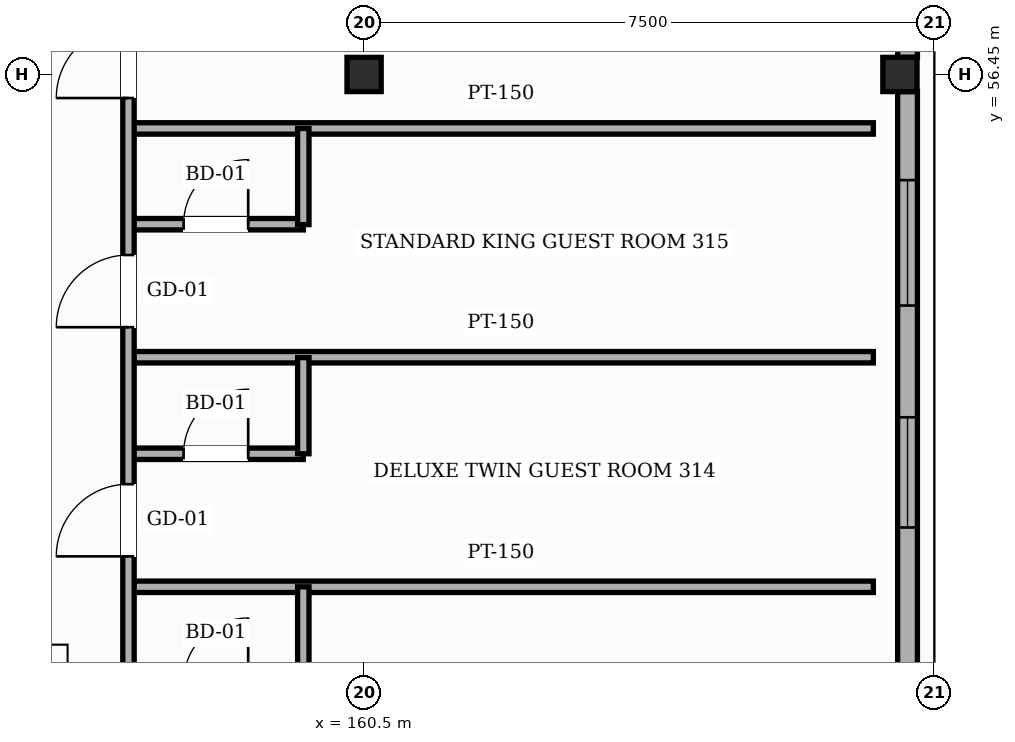
"""IFC4 building model, lengths in metres.
Left out: names, types, materials, properties, quantities, classifications, styles, units other than length and angle.
Written with IfcOpenShell. Run it as: python <this file> out.ifc"""

import sys

from ifc_helpers import new_model, si_unit, direction, frame, frame_2d, origin, origin_2d, place, context, subcontext, project, spatial, rectangle, hollow_rectangle, extrude, element, fill, save


model = new_model("IFC4")
c1 = context("Model", 3, precision=1e-05, world=origin(), true_north=direction((0.0, 1.0)))
c2 = subcontext(c1, "Body", "Model", "MODEL_VIEW")
j1 = project(units=[si_unit("LENGTHUNIT", "METRE"), si_unit("PLANEANGLEUNIT", "RADIAN")], contexts=[c1])
p1 = place(None, origin())
s1 = spatial("IfcSite", under=j1, at=p1, CompositionType="ELEMENT")
p2 = place(p1, origin())
s2 = spatial("IfcBuilding", under=s1, at=p2, CompositionType="ELEMENT")
p3 = place(p2, frame((0.0, 0.0, 42.6)))
s3 = spatial("IfcBuildingStorey", under=s2, at=p3, CompositionType="ELEMENT", Elevation=42.6)
for number, where, z_axis, x_axis in (
    (1, (160.5, 56.45, 0.0), (0.0, 0.0, 1.0), (1.0, 0.0, 0.0)),
    (2, (167.55, 56.45, 0.0), (0.0, 0.0, 1.0), (1.0, 0.0, 0.0)),
):
    element("IfcColumn", number, at=place(p3, frame(where, z_axis=z_axis, x_axis=x_axis)), inside=s3, PredefinedType="COLUMN", context=c2, shape_type="SweptSolid", body=[
        extrude(hollow_rectangle(XDim=0.45, YDim=0.45, WallThickness=0.019, InnerFilletRadius=0.019, OuterFilletRadius=0.038, at=origin_2d()), origin(), (0.0, 0.0, 1.0), 3.6),
    ])
p4 = place(p3, frame((167.65, 56.225, 0.0), z_axis=(0.0, 0.0, 1.0), x_axis=(0.0, -1.0, 0.0)))
e3 = element("IfcWall", 3, at=p4, inside=s3, PredefinedType="SOLIDWALL", context=c2, shape_type="SweptSolid", body=[
    extrude(rectangle(XDim=7.55, YDim=0.26, at=frame_2d((3.775, 0.0))), origin(), (0.0, 0.0, 1.0), 2.755),
])
p5 = place(p4, frame((4.285, 0.0, 0.85)))
e4 = element("IfcOpeningElement", 4, at=p5, cuts=e3, PredefinedType="OPENING", context=c2, shape_type="SweptSolid", body=[
    extrude(rectangle(XDim=1.45, YDim=1.35, at=frame_2d((0.725, 0.675))), frame((0.0, 0.14, 0.0), z_axis=(0.0, -1.0, 0.0), x_axis=(1.0, 0.0, 0.0)), (0.0, 0.0, 1.0), 0.28),
])
p6 = place(p4, frame((1.165, 0.0, 0.85)))
e5 = element("IfcOpeningElement", 5, at=p6, cuts=e3, PredefinedType="OPENING", context=c2, shape_type="SweptSolid", body=[
    extrude(rectangle(XDim=1.65, YDim=1.35, at=frame_2d((0.825, 0.675))), frame((0.0, 0.14, 0.0), z_axis=(0.0, -1.0, 0.0), x_axis=(1.0, 0.0, 0.0)), (0.0, 0.0, 1.0), 0.28),
])
p7 = place(p3, frame((167.65, 64.225, 0.0), z_axis=(0.0, 0.0, 1.0), x_axis=(0.0, -1.0, 0.0)))
e6 = element("IfcWall", 6, at=p7, inside=s3, PredefinedType="SOLIDWALL", context=c2, shape_type="SweptSolid", body=[
    extrude(rectangle(XDim=7.55, YDim=0.26, at=frame_2d((3.775, 0.0))), origin(), (0.0, 0.0, 1.0), 2.755),
])
p8 = place(p7, frame((6.085, 0.0, 0.85)))
e7 = element("IfcOpeningElement", 7, at=p8, cuts=e6, PredefinedType="OPENING", context=c2, shape_type="SweptSolid", body=[
    extrude(rectangle(XDim=0.85, YDim=1.35, at=frame_2d((0.425, 0.675))), frame((0.0, 0.14, 0.0), z_axis=(0.0, -1.0, 0.0), x_axis=(1.0, 0.0, 0.0)), (0.0, 0.0, 1.0), 0.28),
])
p9 = place(p7, frame((2.92, 0.0, 0.85)))
e8 = element("IfcOpeningElement", 8, at=p9, cuts=e6, PredefinedType="OPENING", context=c2, shape_type="SweptSolid", body=[
    extrude(rectangle(XDim=2.1, YDim=1.35, at=frame_2d((1.05, 0.675))), frame((0.0, 0.14, 0.0), z_axis=(0.0, -1.0, 0.0), x_axis=(1.0, 0.0, 0.0)), (0.0, 0.0, 1.0), 0.28),
])
p10 = place(p7, frame((0.81, 0.0, 0.85)))
e9 = element("IfcOpeningElement", 9, at=p10, cuts=e6, PredefinedType="OPENING", context=c2, shape_type="SweptSolid", body=[
    extrude(rectangle(XDim=0.85, YDim=1.35, at=frame_2d((0.425, 0.675))), frame((0.0, 0.14, 0.0), z_axis=(0.0, -1.0, 0.0), x_axis=(1.0, 0.0, 0.0)), (0.0, 0.0, 1.0), 0.28),
])
p11 = place(p3, frame((157.4, 49.71, 0.0), z_axis=(0.0, 0.0, 1.0), x_axis=(1.0, 0.0, 0.0)))
e10 = element("IfcWall", 10, at=p11, inside=s3, PredefinedType="PARTITIONING", context=c2, shape_type="SweptSolid", body=[
    extrude(rectangle(XDim=9.8, YDim=0.15, at=frame_2d((4.9, 0.0))), origin(), (0.0, 0.0, 1.0), 3.365),
])
p12 = place(p3, frame((157.4, 51.46, 0.0), z_axis=(0.0, 0.0, 1.0), x_axis=(1.0, 0.0, 0.0)))
e11 = element("IfcWall", 11, at=p12, inside=s3, PredefinedType="PARTITIONING", context=c2, shape_type="SweptSolid", body=[
    extrude(rectangle(XDim=2.3, YDim=0.15, at=frame_2d((1.15, 0.0))), origin(), (0.0, 0.0, 1.0), 3.365),
])
p13 = place(p12, frame((0.725, 0.0, 0.0)))
e12 = element("IfcOpeningElement", 12, at=p13, cuts=e11, PredefinedType="OPENING", context=c2, shape_type="SweptSolid", body=[
    extrude(rectangle(XDim=0.85, YDim=2.1, at=frame_2d((0.425, 1.05))), frame((0.0, 0.085, 0.0), z_axis=(0.0, -1.0, 0.0), x_axis=(1.0, 0.0, 0.0)), (0.0, 0.0, 1.0), 0.17),
])
p14 = place(p3, frame((157.4, 52.73, 0.0), z_axis=(0.0, 0.0, 1.0), x_axis=(1.0, 0.0, 0.0)))
e13 = element("IfcWall", 13, at=p14, inside=s3, PredefinedType="PARTITIONING", context=c2, shape_type="SweptSolid", body=[
    extrude(rectangle(XDim=9.8, YDim=0.15, at=frame_2d((4.9, 0.0))), origin(), (0.0, 0.0, 1.0), 3.105),
])
p15 = place(p3, frame((157.4, 54.48, 0.0), z_axis=(0.0, 0.0, 1.0), x_axis=(1.0, 0.0, 0.0)))
e14 = element("IfcWall", 14, at=p15, inside=s3, PredefinedType="PARTITIONING", context=c2, shape_type="SweptSolid", body=[
    extrude(rectangle(XDim=2.3, YDim=0.15, at=frame_2d((1.15, 0.0))), origin(), (0.0, 0.0, 1.0), 3.365),
])
p16 = place(p15, frame((0.725, 0.0, 0.0)))
e15 = element("IfcOpeningElement", 15, at=p16, cuts=e14, PredefinedType="OPENING", context=c2, shape_type="SweptSolid", body=[
    extrude(rectangle(XDim=0.85, YDim=2.1, at=frame_2d((0.425, 1.05))), frame((0.0, 0.085, 0.0), z_axis=(0.0, -1.0, 0.0), x_axis=(1.0, 0.0, 0.0)), (0.0, 0.0, 1.0), 0.17),
])
p17 = place(p3, frame((157.4, 55.74, 0.0), z_axis=(0.0, 0.0, 1.0), x_axis=(1.0, 0.0, 0.0)))
e16 = element("IfcWall", 16, at=p17, inside=s3, PredefinedType="PARTITIONING", context=c2, shape_type="SweptSolid", body=[
    extrude(rectangle(XDim=9.8, YDim=0.15, at=frame_2d((4.9, 0.0))), origin(), (0.0, 0.0, 1.0), 3.365),
])
p18 = place(p3, frame((157.4, 22.6, 0.0), z_axis=(0.0, 0.0, 1.0), x_axis=(0.0, 1.0, 0.0)))
e17 = element("IfcWall", 17, at=p18, inside=s3, PredefinedType="PARTITIONING", context=c2, shape_type="SweptSolid", body=[
    extrude(rectangle(XDim=48.2, YDim=0.15, at=frame_2d((24.1, 0.0))), origin(), (0.0, 0.0, 1.0), 3.365),
])
p19 = place(p18, frame((0.325, 0.0, 0.0)))
e18 = element("IfcOpeningElement", 18, at=p19, cuts=e17, PredefinedType="OPENING", context=c2, shape_type="SweptSolid", body=[
    extrude(rectangle(XDim=1.1, YDim=2.2, at=frame_2d((0.55, 1.1))), frame((0.0, 0.085, 0.0), z_axis=(0.0, -1.0, 0.0), x_axis=(1.0, 0.0, 0.0)), (0.0, 0.0, 1.0), 0.17),
])
p20 = place(p18, frame((3.41, 0.0, 0.0)))
e19 = element("IfcOpeningElement", 19, at=p20, cuts=e17, PredefinedType="OPENING", context=c2, shape_type="SweptSolid", body=[
    extrude(rectangle(XDim=0.95, YDim=2.15, at=frame_2d((0.475, 1.075))), frame((0.0, 0.085, 0.0), z_axis=(0.0, -1.0, 0.0), x_axis=(1.0, 0.0, 0.0)), (0.0, 0.0, 1.0), 0.17),
])
p21 = place(p18, frame((6.425, 0.0, 0.0)))
e20 = element("IfcOpeningElement", 20, at=p21, cuts=e17, PredefinedType="OPENING", context=c2, shape_type="SweptSolid", body=[
    extrude(rectangle(XDim=0.95, YDim=2.15, at=frame_2d((0.475, 1.075))), frame((0.0, 0.085, 0.0), z_axis=(0.0, -1.0, 0.0), x_axis=(1.0, 0.0, 0.0)), (0.0, 0.0, 1.0), 0.17),
])
p22 = place(p18, frame((9.44, 0.0, 0.0)))
e21 = element("IfcOpeningElement", 21, at=p22, cuts=e17, PredefinedType="OPENING", context=c2, shape_type="SweptSolid", body=[
    extrude(rectangle(XDim=0.95, YDim=2.15, at=frame_2d((0.475, 1.075))), frame((0.0, 0.085, 0.0), z_axis=(0.0, -1.0, 0.0), x_axis=(1.0, 0.0, 0.0)), (0.0, 0.0, 1.0), 0.17),
])
p23 = place(p18, frame((12.45, 0.0, 0.0)))
e22 = element("IfcOpeningElement", 22, at=p23, cuts=e17, PredefinedType="OPENING", context=c2, shape_type="SweptSolid", body=[
    extrude(rectangle(XDim=0.95, YDim=2.15, at=frame_2d((0.475, 1.075))), frame((0.0, 0.085, 0.0), z_axis=(0.0, -1.0, 0.0), x_axis=(1.0, 0.0, 0.0)), (0.0, 0.0, 1.0), 0.17),
])
p24 = place(p18, frame((15.46, 0.0, 0.0)))
e23 = element("IfcOpeningElement", 23, at=p24, cuts=e17, PredefinedType="OPENING", context=c2, shape_type="SweptSolid", body=[
    extrude(rectangle(XDim=0.95, YDim=2.15, at=frame_2d((0.475, 1.075))), frame((0.0, 0.085, 0.0), z_axis=(0.0, -1.0, 0.0), x_axis=(1.0, 0.0, 0.0)), (0.0, 0.0, 1.0), 0.17),
])
p25 = place(p18, frame((18.475, 0.0, 0.0)))
e24 = element("IfcOpeningElement", 24, at=p25, cuts=e17, PredefinedType="OPENING", context=c2, shape_type="SweptSolid", body=[
    extrude(rectangle(XDim=0.95, YDim=2.15, at=frame_2d((0.475, 1.075))), frame((0.0, 0.085, 0.0), z_axis=(0.0, -1.0, 0.0), x_axis=(1.0, 0.0, 0.0)), (0.0, 0.0, 1.0), 0.17),
])
p26 = place(p18, frame((21.49, 0.0, 0.0)))
e25 = element("IfcOpeningElement", 25, at=p26, cuts=e17, PredefinedType="OPENING", context=c2, shape_type="SweptSolid", body=[
    extrude(rectangle(XDim=0.95, YDim=2.15, at=frame_2d((0.475, 1.075))), frame((0.0, 0.085, 0.0), z_axis=(0.0, -1.0, 0.0), x_axis=(1.0, 0.0, 0.0)), (0.0, 0.0, 1.0), 0.17),
])
p27 = place(p18, frame((24.5, 0.0, 0.0)))
e26 = element("IfcOpeningElement", 26, at=p27, cuts=e17, PredefinedType="OPENING", context=c2, shape_type="SweptSolid", body=[
    extrude(rectangle(XDim=0.95, YDim=2.15, at=frame_2d((0.475, 1.075))), frame((0.0, 0.085, 0.0), z_axis=(0.0, -1.0, 0.0), x_axis=(1.0, 0.0, 0.0)), (0.0, 0.0, 1.0), 0.17),
])
p28 = place(p18, frame((27.51, 0.0, 0.0)))
e27 = element("IfcOpeningElement", 27, at=p28, cuts=e17, PredefinedType="OPENING", context=c2, shape_type="SweptSolid", body=[
    extrude(rectangle(XDim=0.95, YDim=2.15, at=frame_2d((0.475, 1.075))), frame((0.0, 0.085, 0.0), z_axis=(0.0, -1.0, 0.0), x_axis=(1.0, 0.0, 0.0)), (0.0, 0.0, 1.0), 0.17),
])
p29 = place(p18, frame((30.525, 0.0, 0.0)))
e28 = element("IfcOpeningElement", 28, at=p29, cuts=e17, PredefinedType="OPENING", context=c2, shape_type="SweptSolid", body=[
    extrude(rectangle(XDim=0.95, YDim=2.15, at=frame_2d((0.475, 1.075))), frame((0.0, 0.085, 0.0), z_axis=(0.0, -1.0, 0.0), x_axis=(1.0, 0.0, 0.0)), (0.0, 0.0, 1.0), 0.17),
])
p30 = place(p18, frame((33.54, 0.0, 0.0)))
e29 = element("IfcOpeningElement", 29, at=p30, cuts=e17, PredefinedType="OPENING", context=c2, shape_type="SweptSolid", body=[
    extrude(rectangle(XDim=0.95, YDim=2.15, at=frame_2d((0.475, 1.075))), frame((0.0, 0.085, 0.0), z_axis=(0.0, -1.0, 0.0), x_axis=(1.0, 0.0, 0.0)), (0.0, 0.0, 1.0), 0.17),
])
p31 = place(p18, frame((36.55, 0.0, 0.0)))
e30 = element("IfcOpeningElement", 30, at=p31, cuts=e17, PredefinedType="OPENING", context=c2, shape_type="SweptSolid", body=[
    extrude(rectangle(XDim=0.95, YDim=2.15, at=frame_2d((0.475, 1.075))), frame((0.0, 0.085, 0.0), z_axis=(0.0, -1.0, 0.0), x_axis=(1.0, 0.0, 0.0)), (0.0, 0.0, 1.0), 0.17),
])
p32 = place(p18, frame((39.56, 0.0, 0.0)))
e31 = element("IfcOpeningElement", 31, at=p32, cuts=e17, PredefinedType="OPENING", context=c2, shape_type="SweptSolid", body=[
    extrude(rectangle(XDim=0.95, YDim=2.15, at=frame_2d((0.475, 1.075))), frame((0.0, 0.085, 0.0), z_axis=(0.0, -1.0, 0.0), x_axis=(1.0, 0.0, 0.0)), (0.0, 0.0, 1.0), 0.17),
])
p33 = place(p18, frame((42.575, 0.0, 0.0)))
e32 = element("IfcOpeningElement", 32, at=p33, cuts=e17, PredefinedType="OPENING", context=c2, shape_type="SweptSolid", body=[
    extrude(rectangle(XDim=0.95, YDim=2.15, at=frame_2d((0.475, 1.075))), frame((0.0, 0.085, 0.0), z_axis=(0.0, -1.0, 0.0), x_axis=(1.0, 0.0, 0.0)), (0.0, 0.0, 1.0), 0.17),
])
p34 = place(p18, frame((45.585, 0.0, 0.0)))
e33 = element("IfcOpeningElement", 33, at=p34, cuts=e17, PredefinedType="OPENING", context=c2, shape_type="SweptSolid", body=[
    extrude(rectangle(XDim=0.95, YDim=2.15, at=frame_2d((0.475, 1.075))), frame((0.0, 0.085, 0.0), z_axis=(0.0, -1.0, 0.0), x_axis=(1.0, 0.0, 0.0)), (0.0, 0.0, 1.0), 0.17),
])
p35 = place(p3, frame((159.7, 48.45, 0.0), z_axis=(0.0, 0.0, 1.0), x_axis=(0.0, 1.0, 0.0)))
e34 = element("IfcWall", 34, at=p35, inside=s3, PredefinedType="PARTITIONING", context=c2, shape_type="SweptSolid", body=[
    extrude(rectangle(XDim=1.26, YDim=0.15, at=frame_2d((0.63, 0.0))), origin(), (0.0, 0.0, 1.0), 3.365),
])
p36 = place(p3, frame((159.7, 51.46, 0.0), z_axis=(0.0, 0.0, 1.0), x_axis=(0.0, 1.0, 0.0)))
e35 = element("IfcWall", 35, at=p36, inside=s3, PredefinedType="PARTITIONING", context=c2, shape_type="SweptSolid", body=[
    extrude(rectangle(XDim=1.265, YDim=0.15, at=frame_2d((0.633, 0.0))), origin(), (0.0, 0.0, 1.0), 3.365),
])
p37 = place(p3, frame((159.7, 54.475, 0.0), z_axis=(0.0, 0.0, 1.0), x_axis=(0.0, 1.0, 0.0)))
e36 = element("IfcWall", 36, at=p37, inside=s3, PredefinedType="PARTITIONING", context=c2, shape_type="SweptSolid", body=[
    extrude(rectangle(XDim=1.265, YDim=0.15, at=frame_2d((0.632, 0.0))), origin(), (0.0, 0.0, 1.0), 3.365),
])
p38 = place(p5, origin())
e37 = element("IfcWindow", 37, at=p38, inside=s3, PartitioningType="SINGLE_PANEL", PredefinedType="WINDOW", context=c2, shape_type="SweptSolid", body=[
    extrude(rectangle(XDim=1.45, YDim=1.35, at=frame_2d((0.725, 0.675))), frame((0.0, 0.03, 0.0), z_axis=(0.0, -1.0, 0.0), x_axis=(1.0, 0.0, 0.0)), (0.0, 0.0, 1.0), 0.06),
])
fill(e4, e37)
p39 = place(p6, origin())
e38 = element("IfcWindow", 38, at=p39, inside=s3, PartitioningType="SINGLE_PANEL", PredefinedType="WINDOW", context=c2, shape_type="SweptSolid", body=[
    extrude(rectangle(XDim=1.65, YDim=1.35, at=frame_2d((0.825, 0.675))), frame((0.0, 0.03, 0.0), z_axis=(0.0, -1.0, 0.0), x_axis=(1.0, 0.0, 0.0)), (0.0, 0.0, 1.0), 0.06),
])
fill(e5, e38)
p40 = place(p28, origin())
e39 = element("IfcDoor", 39, at=p40, inside=s3, OperationType="SINGLE_SWING_LEFT", PredefinedType="DOOR", context=c2, shape_type="SweptSolid", body=[
    extrude(rectangle(XDim=0.95, YDim=2.15, at=frame_2d((0.475, 1.075))), frame((0.0, 0.025, 0.0), z_axis=(0.0, -1.0, 0.0), x_axis=(1.0, 0.0, 0.0)), (0.0, 0.0, 1.0), 0.05),
])
fill(e27, e39)
p41 = place(p13, origin())
e40 = element("IfcDoor", 40, at=p41, inside=s3, OperationType="SINGLE_SWING_RIGHT", PredefinedType="DOOR", context=c2, shape_type="SweptSolid", body=[
    extrude(rectangle(XDim=0.85, YDim=2.1, at=frame_2d((0.425, 1.05))), frame((0.0, 0.025, 0.0), z_axis=(0.0, -1.0, 0.0), x_axis=(1.0, 0.0, 0.0)), (0.0, 0.0, 1.0), 0.05),
])
fill(e12, e40)
p42 = place(p29, origin())
e41 = element("IfcDoor", 41, at=p42, inside=s3, OperationType="SINGLE_SWING_LEFT", PredefinedType="DOOR", context=c2, shape_type="SweptSolid", body=[
    extrude(rectangle(XDim=0.95, YDim=2.15, at=frame_2d((0.475, 1.075))), frame((0.0, 0.025, 0.0), z_axis=(0.0, -1.0, 0.0), x_axis=(1.0, 0.0, 0.0)), (0.0, 0.0, 1.0), 0.05),
])
fill(e28, e41)
p43 = place(p16, origin())
e42 = element("IfcDoor", 42, at=p43, inside=s3, OperationType="SINGLE_SWING_RIGHT", PredefinedType="DOOR", context=c2, shape_type="SweptSolid", body=[
    extrude(rectangle(XDim=0.85, YDim=2.1, at=frame_2d((0.425, 1.05))), frame((0.0, 0.025, 0.0), z_axis=(0.0, -1.0, 0.0), x_axis=(1.0, 0.0, 0.0)), (0.0, 0.0, 1.0), 0.05),
])
fill(e15, e42)
p44 = place(p30, origin())
e43 = element("IfcDoor", 43, at=p44, inside=s3, OperationType="SINGLE_SWING_LEFT", PredefinedType="DOOR", context=c2, shape_type="SweptSolid", body=[
    extrude(rectangle(XDim=0.95, YDim=2.15, at=frame_2d((0.475, 1.075))), frame((0.0, 0.025, 0.0), z_axis=(0.0, -1.0, 0.0), x_axis=(1.0, 0.0, 0.0)), (0.0, 0.0, 1.0), 0.05),
])
fill(e29, e43)
save(model, sys.argv[1])
